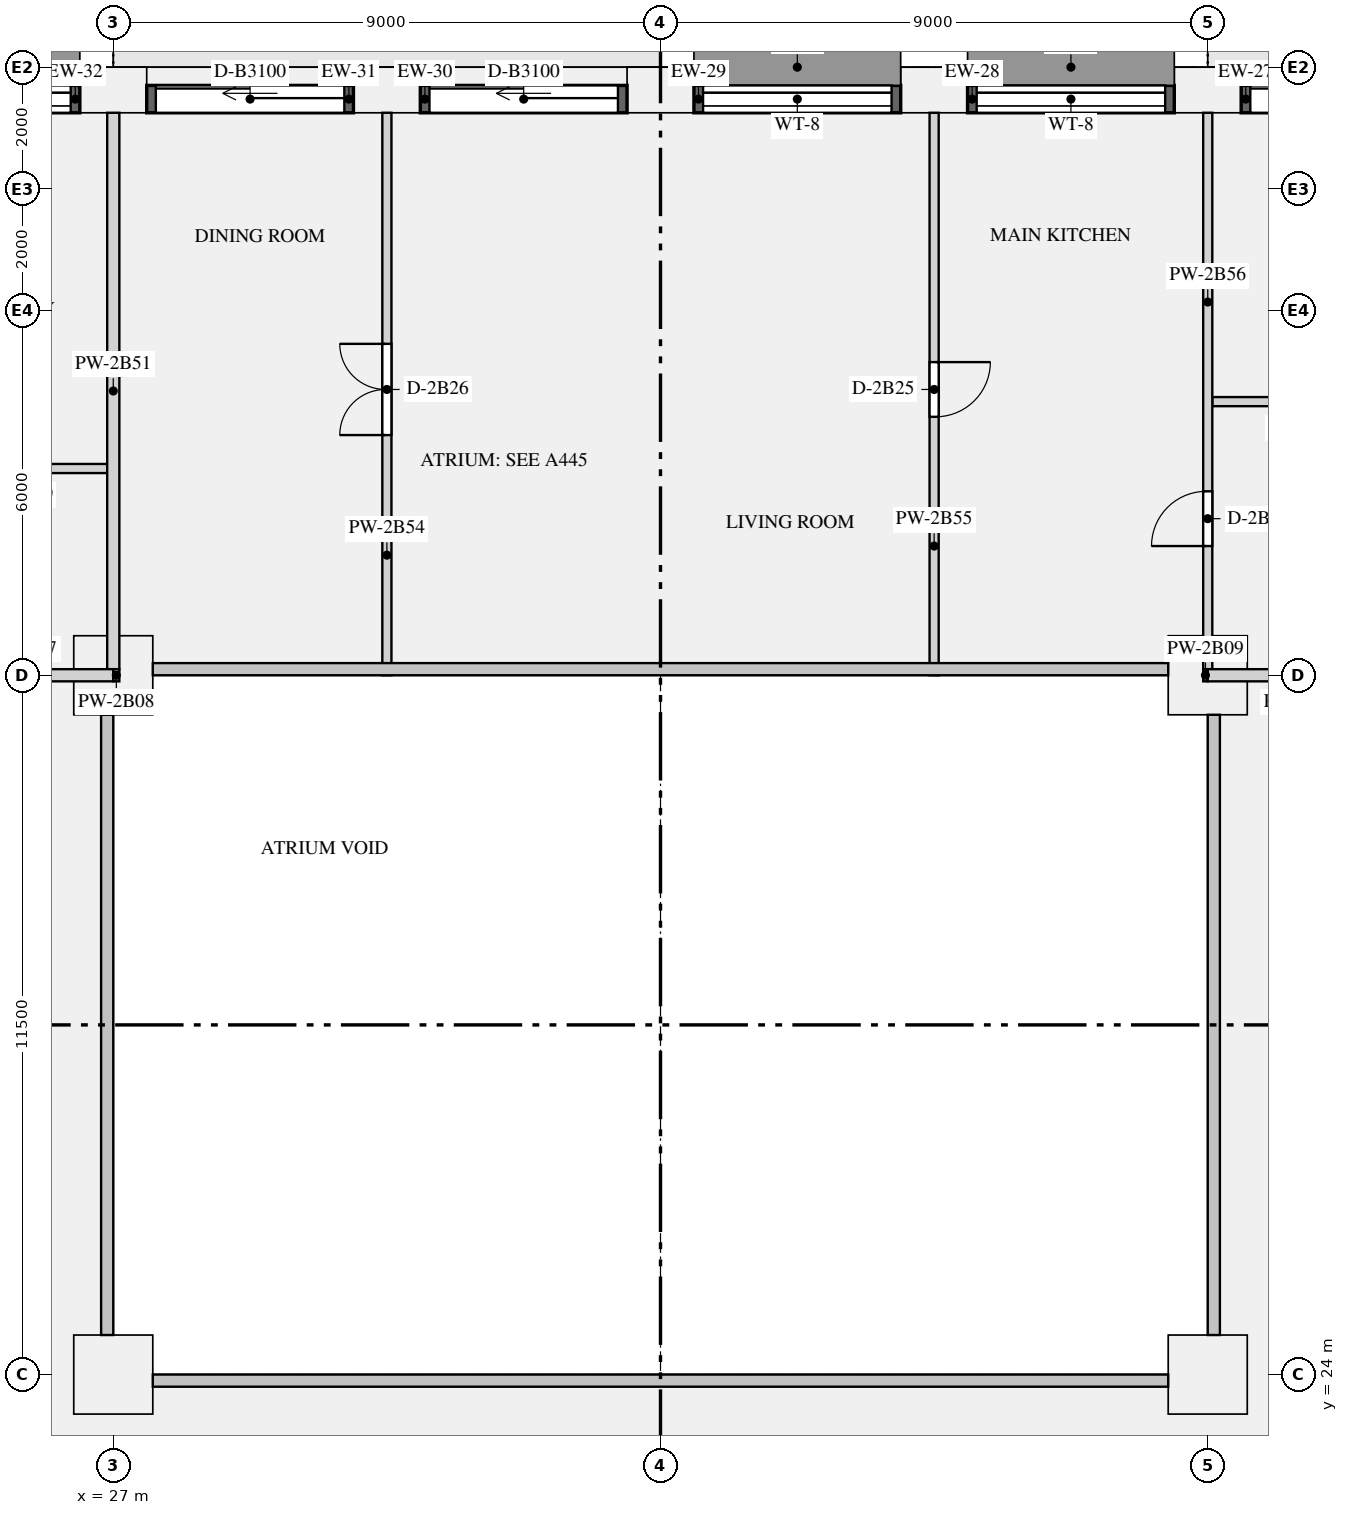
"""IFC4 building model, lengths in metres.
Left out: names, types, materials, properties, quantities, classifications, styles, units other than length and angle.
Written with IfcOpenShell. Run it as: python <this file> out.ifc"""

import sys

from ifc_helpers import new_model, si_unit, direction, frame, frame_2d, origin, origin_2d, place, context, subcontext, project, spatial, rectangle, extrude, element, fill, save


model = new_model("IFC4")
c1 = context("Model", 3, precision=1e-05, world=origin(), true_north=direction((0.0, 1.0)))
c2 = subcontext(c1, "Body", "Model", "MODEL_VIEW")
j1 = project(units=[si_unit("LENGTHUNIT", "METRE"), si_unit("PLANEANGLEUNIT", "RADIAN")], contexts=[c1])
p1 = place(None, origin())
s1 = spatial("IfcSite", under=j1, at=p1, CompositionType="ELEMENT")
p2 = place(p1, origin())
s2 = spatial("IfcBuilding", under=s1, at=p2, CompositionType="ELEMENT")
p3 = place(p2, frame((0.0, 0.0, 93.0)))
s3 = spatial("IfcBuildingStorey", under=s2, at=p3, CompositionType="ELEMENT", Elevation=93.0)
for number, where, z_axis, x_axis in (
    (1, (45.0, 45.125, 0.0), (0.0, 0.0, 1.0), (-1.0, 0.0, 0.0)),
    (2, (40.5, 45.125, 0.0), (0.0, 0.0, 1.0), (-1.0, 0.0, 0.0)),
    (3, (36.0, 45.125, 0.0), (0.0, 0.0, 1.0), (-1.0, 0.0, 0.0)),
    (4, (31.5, 45.125, 0.0), (0.0, 0.0, 1.0), (-1.0, 0.0, 0.0)),
    (5, (27.0, 45.125, 0.0), (0.0, 0.0, 1.0), (-1.0, 0.0, 0.0)),
):
    element("IfcColumn", number, at=place(p3, frame(where, z_axis=z_axis, x_axis=x_axis)), inside=s3, PredefinedType="USERDEFINED", context=c2, shape_type="SweptSolid", body=[
        extrude(rectangle(XDim=1.1, YDim=0.75, at=origin_2d()), origin(), (0.0, 0.0, 1.0), 3.15),
    ])
for number, where, z_axis, x_axis in (
    (6, (27.0, 24.0, 0.0), (0.0, 0.0, 1.0), (1.0, 0.0, 0.0)),
    (7, (45.0, 24.0, 0.0), (0.0, 0.0, 1.0), (1.0, 0.0, 0.0)),
    (8, (27.0, 35.5, 0.0), (0.0, 0.0, 1.0), (1.0, 0.0, 0.0)),
    (9, (45.0, 35.5, 0.0), (0.0, 0.0, 1.0), (1.0, 0.0, 0.0)),
):
    element("IfcColumn", number, at=place(p3, frame(where, z_axis=z_axis, x_axis=x_axis)), inside=s3, PredefinedType="COLUMN", context=c2, shape_type="SweptSolid", body=[
        extrude(rectangle(XDim=1.3, YDim=1.3, at=origin_2d()), origin(), (0.0, 0.0, 1.0), 3.15),
    ])
p4 = place(p3, frame((48.95, 44.975, 0.0), z_axis=(0.0, 0.0, 1.0), x_axis=(-1.0, 0.0, 0.0)))
e10 = element("IfcWall", 10, at=p4, inside=s3, PredefinedType="SOLIDWALL", context=c2, shape_type="SweptSolid", body=[
    extrude(rectangle(XDim=3.4, YDim=0.45, at=frame_2d((1.7, 0.0))), origin(), (0.0, 0.0, 1.0), 2.83),
])
p5 = place(p4, frame((0.15, 0.0, 0.0)))
e11 = element("IfcOpeningElement", 11, at=p5, cuts=e10, PredefinedType="OPENING", context=c2, shape_type="SweptSolid", body=[
    extrude(rectangle(XDim=3.1, YDim=2.3, at=frame_2d((1.55, 1.15))), frame((0.0, 0.235, 0.0), z_axis=(0.0, -1.0, 0.0), x_axis=(1.0, 0.0, 0.0)), (0.0, 0.0, 1.0), 0.47),
])
p6 = place(p3, frame((44.45, 44.975, 0.9), z_axis=(0.0, 0.0, 1.0), x_axis=(-1.0, 0.0, 0.0)))
e12 = element("IfcWall", 12, at=p6, inside=s3, PredefinedType="SOLIDWALL", context=c2, shape_type="SweptSolid", body=[
    extrude(rectangle(XDim=3.4, YDim=0.45, at=frame_2d((1.7, 0.0))), origin(), (0.0, 0.0, 1.0), 1.93),
])
p7 = place(p6, frame((0.15, 0.0, 0.15)))
e13 = element("IfcOpeningElement", 13, at=p7, cuts=e12, PredefinedType="OPENING", context=c2, shape_type="SweptSolid", body=[
    extrude(rectangle(XDim=3.1, YDim=1.5, at=frame_2d((1.55, 0.75))), frame((0.0, 0.235, 0.0), z_axis=(0.0, -1.0, 0.0), x_axis=(1.0, 0.0, 0.0)), (0.0, 0.0, 1.0), 0.47),
])
p8 = place(p3, frame((39.95, 44.975, 0.9), z_axis=(0.0, 0.0, 1.0), x_axis=(-1.0, 0.0, 0.0)))
e14 = element("IfcWall", 14, at=p8, inside=s3, PredefinedType="SOLIDWALL", context=c2, shape_type="SweptSolid", body=[
    extrude(rectangle(XDim=3.4, YDim=0.45, at=frame_2d((1.7, 0.0))), origin(), (0.0, 0.0, 1.0), 1.93),
])
p9 = place(p8, frame((0.15, 0.0, 0.15)))
e15 = element("IfcOpeningElement", 15, at=p9, cuts=e14, PredefinedType="OPENING", context=c2, shape_type="SweptSolid", body=[
    extrude(rectangle(XDim=3.1, YDim=1.5, at=frame_2d((1.55, 0.75))), frame((0.0, 0.235, 0.0), z_axis=(0.0, -1.0, 0.0), x_axis=(1.0, 0.0, 0.0)), (0.0, 0.0, 1.0), 0.47),
])
p10 = place(p3, frame((35.45, 44.975, 0.0), z_axis=(0.0, 0.0, 1.0), x_axis=(-1.0, 0.0, 0.0)))
e16 = element("IfcWall", 16, at=p10, inside=s3, PredefinedType="SOLIDWALL", context=c2, shape_type="SweptSolid", body=[
    extrude(rectangle(XDim=3.4, YDim=0.45, at=frame_2d((1.7, 0.0))), origin(), (0.0, 0.0, 1.0), 2.83),
])
p11 = place(p10, frame((0.15, 0.0, 0.0)))
e17 = element("IfcOpeningElement", 17, at=p11, cuts=e16, PredefinedType="OPENING", context=c2, shape_type="SweptSolid", body=[
    extrude(rectangle(XDim=3.1, YDim=2.3, at=frame_2d((1.55, 1.15))), frame((0.0, 0.235, 0.0), z_axis=(0.0, -1.0, 0.0), x_axis=(1.0, 0.0, 0.0)), (0.0, 0.0, 1.0), 0.47),
])
p12 = place(p3, frame((30.95, 44.975, 0.0), z_axis=(0.0, 0.0, 1.0), x_axis=(-1.0, 0.0, 0.0)))
e18 = element("IfcWall", 18, at=p12, inside=s3, PredefinedType="SOLIDWALL", context=c2, shape_type="SweptSolid", body=[
    extrude(rectangle(XDim=3.4, YDim=0.45, at=frame_2d((1.7, 0.0))), origin(), (0.0, 0.0, 1.0), 2.83),
])
p13 = place(p12, frame((0.15, 0.0, 0.0)))
e19 = element("IfcOpeningElement", 19, at=p13, cuts=e18, PredefinedType="OPENING", context=c2, shape_type="SweptSolid", body=[
    extrude(rectangle(XDim=3.1, YDim=2.3, at=frame_2d((1.55, 1.15))), frame((0.0, 0.235, 0.0), z_axis=(0.0, -1.0, 0.0), x_axis=(1.0, 0.0, 0.0)), (0.0, 0.0, 1.0), 0.47),
])
p14 = place(p3, frame((26.45, 44.975, 0.9), z_axis=(0.0, 0.0, 1.0), x_axis=(-1.0, 0.0, 0.0)))
e20 = element("IfcWall", 20, at=p14, inside=s3, PredefinedType="SOLIDWALL", context=c2, shape_type="SweptSolid", body=[
    extrude(rectangle(XDim=3.4, YDim=0.45, at=frame_2d((1.7, 0.0))), origin(), (0.0, 0.0, 1.0), 1.93),
])
p15 = place(p14, frame((0.15, 0.0, 0.15)))
e21 = element("IfcOpeningElement", 21, at=p15, cuts=e20, PredefinedType="OPENING", context=c2, shape_type="SweptSolid", body=[
    extrude(rectangle(XDim=3.1, YDim=1.5, at=frame_2d((1.55, 0.75))), frame((0.0, 0.235, 0.0), z_axis=(0.0, -1.0, 0.0), x_axis=(1.0, 0.0, 0.0)), (0.0, 0.0, 1.0), 0.47),
])
p16 = place(p3, frame((23.9, 35.5, 0.0), z_axis=(0.0, 0.0, 1.0), x_axis=(1.0, 0.0, 0.0)))
e22 = element("IfcWall", 22, at=p16, inside=s3, PredefinedType="PARTITIONING", context=c2, shape_type="SweptSolid", body=[
    extrude(rectangle(XDim=3.1, YDim=0.2, at=frame_2d((1.55, 0.0))), origin(), (0.0, 0.0, 1.0), 2.83),
])
p17 = place(p3, frame((27.0, 35.5, 0.0), z_axis=(0.0, 0.0, 1.0), x_axis=(1.0, 0.0, 0.0)))
e23 = element("IfcWall", 23, at=p17, inside=s3, PredefinedType="PARTITIONING", context=c2, shape_type="SweptSolid", body=[
    extrude(rectangle(XDim=0.1, YDim=0.2, at=frame_2d((0.05, 0.0))), origin(), (0.0, 0.0, 1.0), 2.83),
])
p18 = place(p3, frame((44.925, 35.5, 0.0), z_axis=(0.0, 0.0, 1.0), x_axis=(1.0, 0.0, 0.0)))
e24 = element("IfcWall", 24, at=p18, inside=s3, PredefinedType="PARTITIONING", context=c2, shape_type="SweptSolid", body=[
    extrude(rectangle(XDim=0.075, YDim=0.2, at=frame_2d((0.038, 0.0))), origin(), (0.0, 0.0, 1.0), 2.83),
])
p19 = place(p3, frame((45.0, 35.5, 0.0), z_axis=(0.0, 0.0, 1.0), x_axis=(1.0, 0.0, 0.0)))
e25 = element("IfcWall", 25, at=p19, inside=s3, PredefinedType="PARTITIONING", context=c2, shape_type="SweptSolid", body=[
    extrude(rectangle(XDim=3.1, YDim=0.2, at=frame_2d((1.55, 0.0))), origin(), (0.0, 0.0, 1.0), 2.83),
])
p20 = place(p3, frame((12.125, 38.9, 0.0), z_axis=(0.0, 0.0, 1.0), x_axis=(1.0, 0.0, 0.0)))
e26 = element("IfcWall", 26, at=p20, inside=s3, PredefinedType="PARTITIONING", context=c2, shape_type="SweptSolid", body=[
    extrude(rectangle(XDim=14.775, YDim=0.15, at=frame_2d((7.387, 0.0))), origin(), (0.0, 0.0, 1.0), 2.83),
])
p21 = place(p20, frame((3.175, 0.0, 0.0)))
e27 = element("IfcOpeningElement", 27, at=p21, cuts=e26, PredefinedType="OPENING", context=c2, shape_type="SweptSolid", body=[
    extrude(rectangle(XDim=0.9, YDim=2.1, at=frame_2d((0.45, 1.05))), frame((0.0, 0.085, 0.0), z_axis=(0.0, -1.0, 0.0), x_axis=(1.0, 0.0, 0.0)), (0.0, 0.0, 1.0), 0.17),
])
p22 = place(p20, frame((12.925, 0.0, 0.0)))
e28 = element("IfcOpeningElement", 28, at=p22, cuts=e26, PredefinedType="OPENING", context=c2, shape_type="SweptSolid", body=[
    extrude(rectangle(XDim=0.9, YDim=2.1, at=frame_2d((0.45, 1.05))), frame((0.0, 0.085, 0.0), z_axis=(0.0, -1.0, 0.0), x_axis=(1.0, 0.0, 0.0)), (0.0, 0.0, 1.0), 0.17),
])
p23 = place(p3, frame((45.075, 40.0, 0.0), z_axis=(0.0, 0.0, 1.0), x_axis=(1.0, 0.0, 0.0)))
e29 = element("IfcWall", 29, at=p23, inside=s3, PredefinedType="PARTITIONING", context=c2, shape_type="SweptSolid", body=[
    extrude(rectangle(XDim=22.325, YDim=0.15, at=frame_2d((11.163, 0.0))), origin(), (0.0, 0.0, 1.0), 2.83),
])
p24 = place(p23, frame((0.975, 0.0, 0.0)))
e30 = element("IfcOpeningElement", 30, at=p24, cuts=e29, PredefinedType="OPENING", context=c2, shape_type="SweptSolid", body=[
    extrude(rectangle(XDim=0.9, YDim=2.1, at=frame_2d((0.45, 1.05))), frame((0.0, 0.085, 0.0), z_axis=(0.0, -1.0, 0.0), x_axis=(1.0, 0.0, 0.0)), (0.0, 0.0, 1.0), 0.17),
])
p25 = place(p23, frame((8.475, 0.0, 0.0)))
e31 = element("IfcOpeningElement", 31, at=p25, cuts=e29, PredefinedType="OPENING", context=c2, shape_type="SweptSolid", body=[
    extrude(rectangle(XDim=0.9, YDim=2.1, at=frame_2d((0.45, 1.05))), frame((0.0, 0.085, 0.0), z_axis=(0.0, -1.0, 0.0), x_axis=(1.0, 0.0, 0.0)), (0.0, 0.0, 1.0), 0.17),
])
p26 = place(p23, frame((19.725, 0.0, 0.0)))
e32 = element("IfcOpeningElement", 32, at=p26, cuts=e29, PredefinedType="OPENING", context=c2, shape_type="SweptSolid", body=[
    extrude(rectangle(XDim=0.9, YDim=2.1, at=frame_2d((0.45, 1.05))), frame((0.0, 0.085, 0.0), z_axis=(0.0, -1.0, 0.0), x_axis=(1.0, 0.0, 0.0)), (0.0, 0.0, 1.0), 0.17),
])
p27 = place(p3, frame((27.0, 35.6, 0.0), z_axis=(0.0, 0.0, 1.0), x_axis=(0.0, 1.0, 0.0)))
e33 = element("IfcWall", 33, at=p27, inside=s3, PredefinedType="PARTITIONING", context=c2, shape_type="SweptSolid", body=[
    extrude(rectangle(XDim=9.15, YDim=0.2, at=frame_2d((4.575, 0.0))), origin(), (0.0, 0.0, 1.0), 2.83),
])
p28 = place(p3, frame((31.5, 35.5, 0.0), z_axis=(0.0, 0.0, 1.0), x_axis=(0.0, 1.0, 0.0)))
e34 = element("IfcWall", 34, at=p28, inside=s3, PredefinedType="PARTITIONING", context=c2, shape_type="SweptSolid", body=[
    extrude(rectangle(XDim=9.25, YDim=0.15, at=frame_2d((4.625, 0.0))), origin(), (0.0, 0.0, 1.0), 2.83),
])
p29 = place(p28, frame((3.95, 0.0, 0.0)))
e35 = element("IfcOpeningElement", 35, at=p29, cuts=e34, PredefinedType="OPENING", context=c2, shape_type="SweptSolid", body=[
    extrude(rectangle(XDim=1.5, YDim=2.1, at=frame_2d((0.75, 1.05))), frame((0.0, 0.085, 0.0), z_axis=(0.0, -1.0, 0.0), x_axis=(1.0, 0.0, 0.0)), (0.0, 0.0, 1.0), 0.17),
])
p30 = place(p3, frame((40.5, 35.5, 0.0), z_axis=(0.0, 0.0, 1.0), x_axis=(0.0, 1.0, 0.0)))
e36 = element("IfcWall", 36, at=p30, inside=s3, PredefinedType="PARTITIONING", context=c2, shape_type="SweptSolid", body=[
    extrude(rectangle(XDim=9.25, YDim=0.15, at=frame_2d((4.625, 0.0))), origin(), (0.0, 0.0, 1.0), 2.83),
])
p31 = place(p30, frame((4.25, 0.0, 0.0)))
e37 = element("IfcOpeningElement", 37, at=p31, cuts=e36, PredefinedType="OPENING", context=c2, shape_type="SweptSolid", body=[
    extrude(rectangle(XDim=0.9, YDim=2.1, at=frame_2d((0.45, 1.05))), frame((0.0, 0.085, 0.0), z_axis=(0.0, -1.0, 0.0), x_axis=(1.0, 0.0, 0.0)), (0.0, 0.0, 1.0), 0.17),
])
p32 = place(p3, frame((45.0, 35.6, 0.0), z_axis=(0.0, 0.0, 1.0), x_axis=(0.0, 1.0, 0.0)))
e38 = element("IfcWall", 38, at=p32, inside=s3, PredefinedType="PARTITIONING", context=c2, shape_type="SweptSolid", body=[
    extrude(rectangle(XDim=9.15, YDim=0.15, at=frame_2d((4.575, 0.0))), origin(), (0.0, 0.0, 1.0), 2.83),
])
p33 = place(p32, frame((2.025, 0.0, 0.0)))
e39 = element("IfcOpeningElement", 39, at=p33, cuts=e38, PredefinedType="OPENING", context=c2, shape_type="SweptSolid", body=[
    extrude(rectangle(XDim=0.9, YDim=2.1, at=frame_2d((0.45, 1.05))), frame((0.0, 0.085, 0.0), z_axis=(0.0, -1.0, 0.0), x_axis=(1.0, 0.0, 0.0)), (0.0, 0.0, 1.0), 0.17),
])
p34 = place(p5, origin())
e40 = element("IfcDoor", 40, at=p34, inside=s3, OperationType="SLIDING_TO_LEFT", PredefinedType="DOOR", context=c2, shape_type="SweptSolid", body=[
    extrude(rectangle(XDim=3.1, YDim=2.3, at=frame_2d((1.55, 1.15))), frame((0.0, -0.07, 0.0), z_axis=(0.0, -1.0, 0.0), x_axis=(1.0, 0.0, 0.0)), (0.0, 0.0, 1.0), 0.05),
])
fill(e11, e40)
p35 = place(p7, origin())
e41 = element("IfcWindow", 41, at=p35, inside=s3, PartitioningType="SINGLE_PANEL", PredefinedType="WINDOW", context=c2, shape_type="SweptSolid", body=[
    extrude(rectangle(XDim=3.1, YDim=1.5, at=frame_2d((1.55, 0.75))), frame((0.0, -0.065, 0.0), z_axis=(0.0, -1.0, 0.0), x_axis=(1.0, 0.0, 0.0)), (0.0, 0.0, 1.0), 0.06),
])
fill(e13, e41)
p36 = place(p9, origin())
e42 = element("IfcWindow", 42, at=p36, inside=s3, PartitioningType="SINGLE_PANEL", PredefinedType="WINDOW", context=c2, shape_type="SweptSolid", body=[
    extrude(rectangle(XDim=3.1, YDim=1.5, at=frame_2d((1.55, 0.75))), frame((0.0, -0.065, 0.0), z_axis=(0.0, -1.0, 0.0), x_axis=(1.0, 0.0, 0.0)), (0.0, 0.0, 1.0), 0.06),
])
fill(e15, e42)
p37 = place(p11, origin())
e43 = element("IfcDoor", 43, at=p37, inside=s3, OperationType="SLIDING_TO_LEFT", PredefinedType="DOOR", context=c2, shape_type="SweptSolid", body=[
    extrude(rectangle(XDim=3.1, YDim=2.3, at=frame_2d((1.55, 1.15))), frame((0.0, -0.07, 0.0), z_axis=(0.0, -1.0, 0.0), x_axis=(1.0, 0.0, 0.0)), (0.0, 0.0, 1.0), 0.05),
])
fill(e17, e43)
p38 = place(p13, origin())
e44 = element("IfcDoor", 44, at=p38, inside=s3, OperationType="SLIDING_TO_LEFT", PredefinedType="DOOR", context=c2, shape_type="SweptSolid", body=[
    extrude(rectangle(XDim=3.1, YDim=2.3, at=frame_2d((1.55, 1.15))), frame((0.0, -0.07, 0.0), z_axis=(0.0, -1.0, 0.0), x_axis=(1.0, 0.0, 0.0)), (0.0, 0.0, 1.0), 0.05),
])
fill(e19, e44)
p39 = place(p15, origin())
e45 = element("IfcWindow", 45, at=p39, inside=s3, PartitioningType="SINGLE_PANEL", PredefinedType="WINDOW", context=c2, shape_type="SweptSolid", body=[
    extrude(rectangle(XDim=3.1, YDim=1.5, at=frame_2d((1.55, 0.75))), frame((0.0, -0.065, 0.0), z_axis=(0.0, -1.0, 0.0), x_axis=(1.0, 0.0, 0.0)), (0.0, 0.0, 1.0), 0.06),
])
fill(e21, e45)
p40 = place(p33, origin())
e46 = element("IfcDoor", 46, at=p40, inside=s3, OperationType="SINGLE_SWING_LEFT", PredefinedType="DOOR", context=c2, shape_type="SweptSolid", body=[
    extrude(rectangle(XDim=0.9, YDim=2.1, at=frame_2d((0.45, 1.05))), frame((0.0, 0.025, 0.0), z_axis=(0.0, -1.0, 0.0), x_axis=(1.0, 0.0, 0.0)), (0.0, 0.0, 1.0), 0.05),
])
fill(e39, e46)
p41 = place(p31, frame((0.9, 0.0, 0.0), z_axis=(0.0, 0.0, 1.0), x_axis=(-1.0, 0.0, 0.0)))
e47 = element("IfcDoor", 47, at=p41, inside=s3, OperationType="SINGLE_SWING_LEFT", PredefinedType="DOOR", context=c2, shape_type="SweptSolid", body=[
    extrude(rectangle(XDim=0.9, YDim=2.1, at=frame_2d((0.45, 1.05))), frame((0.0, 0.025, 0.0), z_axis=(0.0, -1.0, 0.0), x_axis=(1.0, 0.0, 0.0)), (0.0, 0.0, 1.0), 0.05),
])
fill(e37, e47)
p42 = place(p29, origin())
e48 = element("IfcDoor", 48, at=p42, inside=s3, OperationType="DOUBLE_DOOR_SINGLE_SWING", PredefinedType="DOOR", context=c2, shape_type="SweptSolid", body=[
    extrude(rectangle(XDim=1.5, YDim=2.1, at=frame_2d((0.75, 1.05))), frame((0.0, 0.025, 0.0), z_axis=(0.0, -1.0, 0.0), x_axis=(1.0, 0.0, 0.0)), (0.0, 0.0, 1.0), 0.05),
])
fill(e35, e48)
save(model, sys.argv[1])
